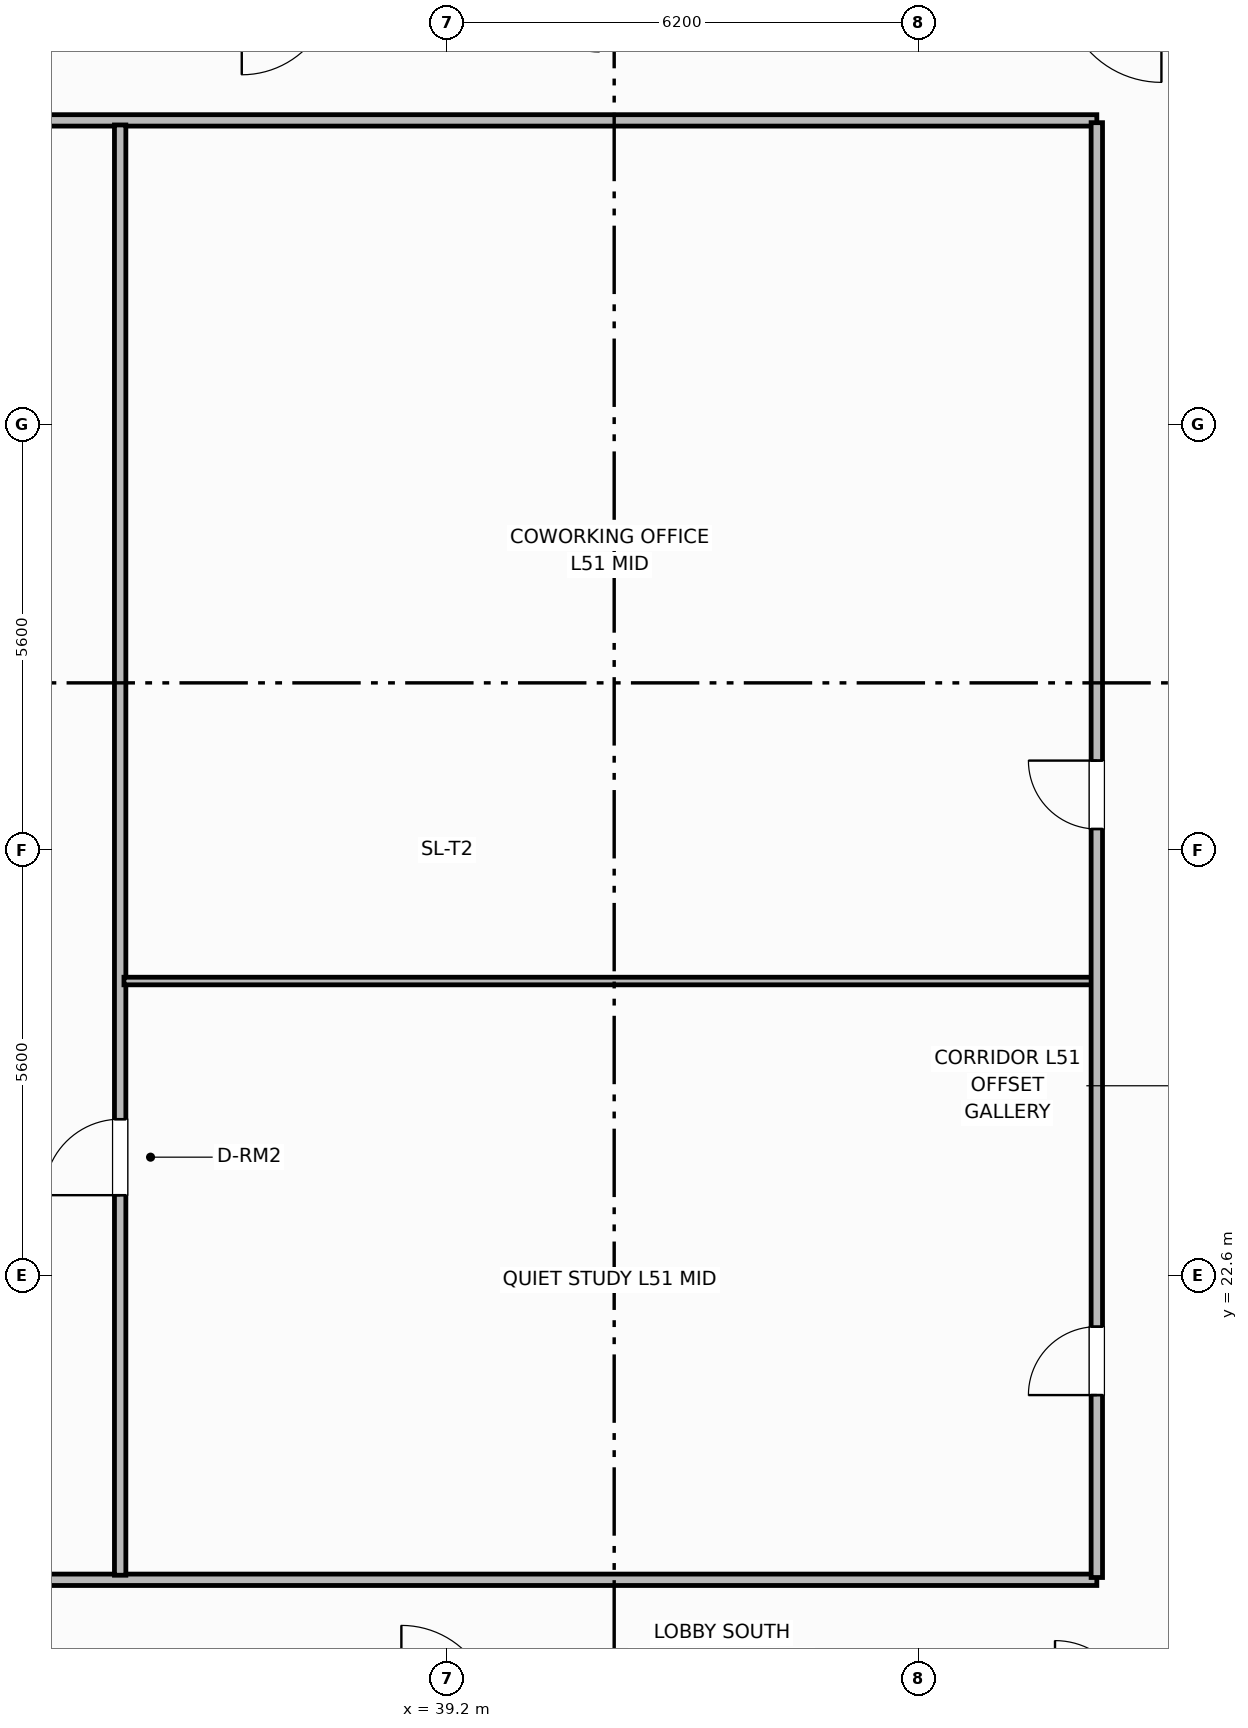
"""IFC4 building model, lengths in metres.
Left out: names, types, materials, properties, quantities, classifications, styles, units other than length and angle.
Written with IfcOpenShell. Run it as: python <this file> out.ifc"""

import sys

from ifc_helpers import new_model, si_unit, direction, frame, frame_2d, origin, place, context, subcontext, project, spatial, rectangle, extrude, element, fill, save


model = new_model("IFC4")
c1 = context("Model", 3, precision=1e-05, world=origin(), true_north=direction((0.0, 1.0)))
c2 = subcontext(c1, "Body", "Model", "MODEL_VIEW")
j1 = project(units=[si_unit("LENGTHUNIT", "METRE"), si_unit("PLANEANGLEUNIT", "RADIAN")], contexts=[c1])
p1 = place(None, origin())
s1 = spatial("IfcSite", under=j1, at=p1, CompositionType="ELEMENT")
p2 = place(p1, origin())
s2 = spatial("IfcBuilding", under=s1, at=p2, CompositionType="ELEMENT")
p3 = place(p2, frame((0.0, 0.0, 207.3)))
s3 = spatial("IfcBuildingStorey", under=s2, at=p3, CompositionType="ELEMENT", Elevation=207.3)
for number, where, z_axis, x_axis in (
    (1, (25.55, 18.6, 0.0), (0.0, 0.0, 1.0), (1.0, 0.0, 0.0)),
    (2, (25.55, 37.8, 0.0), (0.0, 0.0, 1.0), (1.0, 0.0, 0.0)),
):
    element("IfcWall", number, at=place(p3, frame(where, z_axis=z_axis, x_axis=x_axis)), inside=s3, PredefinedType="PARTITIONING", context=c2, shape_type="SweptSolid", body=[
        extrude(rectangle(XDim=22.2, YDim=0.15, at=frame_2d((11.1, 0.0))), origin(), (0.0, 0.0, 1.0), 2.55),
    ])
p4 = place(p3, frame((34.9, 18.66, 0.0), z_axis=(0.0, 0.0, 1.0), x_axis=(0.0, 1.0, 0.0)))
e3 = element("IfcWall", 3, at=p4, inside=s3, PredefinedType="PARTITIONING", context=c2, shape_type="SweptSolid", body=[
    extrude(rectangle(XDim=19.08, YDim=0.15, at=frame_2d((9.54, 0.0))), origin(), (0.0, 0.0, 1.0), 2.55),
])
p5 = place(p4, frame((5.0, 0.0, 0.0)))
e4 = element("IfcOpeningElement", 4, at=p5, cuts=e3, PredefinedType="OPENING", context=c2, shape_type="SweptSolid", body=[
    extrude(rectangle(XDim=1.0, YDim=2.15, at=frame_2d((0.5, 1.075))), frame((0.0, 0.085, 0.0), z_axis=(0.0, -1.0, 0.0), x_axis=(1.0, 0.0, 0.0)), (0.0, 0.0, 1.0), 0.17),
])
p6 = place(p3, frame((34.95, 26.477, 0.0), z_axis=(0.0, 0.0, 1.0), x_axis=(1.0, 0.0, 0.0)))
e5 = element("IfcWall", 5, at=p6, inside=s3, PredefinedType="PARTITIONING", context=c2, shape_type="SweptSolid", body=[
    extrude(rectangle(XDim=12.81, YDim=0.1, at=frame_2d((6.405, 0.0))), origin(), (0.0, 0.0, 1.0), 2.55),
])
p7 = place(p3, frame((47.75, 18.63, 0.0), z_axis=(0.0, 0.0, 1.0), x_axis=(0.0, 1.0, 0.0)))
e6 = element("IfcWall", 6, at=p7, inside=s3, PredefinedType="PARTITIONING", context=c2, shape_type="SweptSolid", body=[
    extrude(rectangle(XDim=19.14, YDim=0.15, at=frame_2d((9.57, 0.0))), origin(), (0.0, 0.0, 1.0), 2.55),
])
p8 = place(p7, frame((2.4, 0.0, 0.0)))
e7 = element("IfcOpeningElement", 7, at=p8, cuts=e6, PredefinedType="OPENING", context=c2, shape_type="SweptSolid", body=[
    extrude(rectangle(XDim=0.9, YDim=2.1, at=frame_2d((0.45, 1.05))), frame((0.0, 0.085, 0.0), z_axis=(0.0, -1.0, 0.0), x_axis=(1.0, 0.0, 0.0)), (0.0, 0.0, 1.0), 0.17),
])
p9 = place(p7, frame((9.847, 0.0, 0.0)))
e8 = element("IfcOpeningElement", 8, at=p9, cuts=e6, PredefinedType="OPENING", context=c2, shape_type="SweptSolid", body=[
    extrude(rectangle(XDim=0.9, YDim=2.1, at=frame_2d((0.45, 1.05))), frame((0.0, 0.085, 0.0), z_axis=(0.0, -1.0, 0.0), x_axis=(1.0, 0.0, 0.0)), (0.0, 0.0, 1.0), 0.17),
])
p10 = place(p5, origin())
e9 = element("IfcDoor", 9, at=p10, inside=s3, OperationType="SINGLE_SWING_LEFT", PredefinedType="DOOR", context=c2, shape_type="SweptSolid", body=[
    extrude(rectangle(XDim=1.0, YDim=2.15, at=frame_2d((0.5, 1.075))), frame((0.0, 0.025, 0.0), z_axis=(0.0, -1.0, 0.0), x_axis=(1.0, 0.0, 0.0)), (0.0, 0.0, 1.0), 0.05),
])
fill(e4, e9)
p11 = place(p8, origin())
e10 = element("IfcDoor", 10, at=p11, inside=s3, OperationType="SINGLE_SWING_LEFT", PredefinedType="DOOR", context=c2, shape_type="SweptSolid", body=[
    extrude(rectangle(XDim=0.9, YDim=2.1, at=frame_2d((0.45, 1.05))), frame((0.0, 0.025, 0.0), z_axis=(0.0, -1.0, 0.0), x_axis=(1.0, 0.0, 0.0)), (0.0, 0.0, 1.0), 0.05),
])
fill(e7, e10)
p12 = place(p9, origin())
e11 = element("IfcDoor", 11, at=p12, inside=s3, OperationType="SINGLE_SWING_RIGHT", PredefinedType="DOOR", context=c2, shape_type="SweptSolid", body=[
    extrude(rectangle(XDim=0.9, YDim=2.1, at=frame_2d((0.45, 1.05))), frame((0.0, 0.025, 0.0), z_axis=(0.0, -1.0, 0.0), x_axis=(1.0, 0.0, 0.0)), (0.0, 0.0, 1.0), 0.05),
])
fill(e8, e11)
save(model, sys.argv[1])
